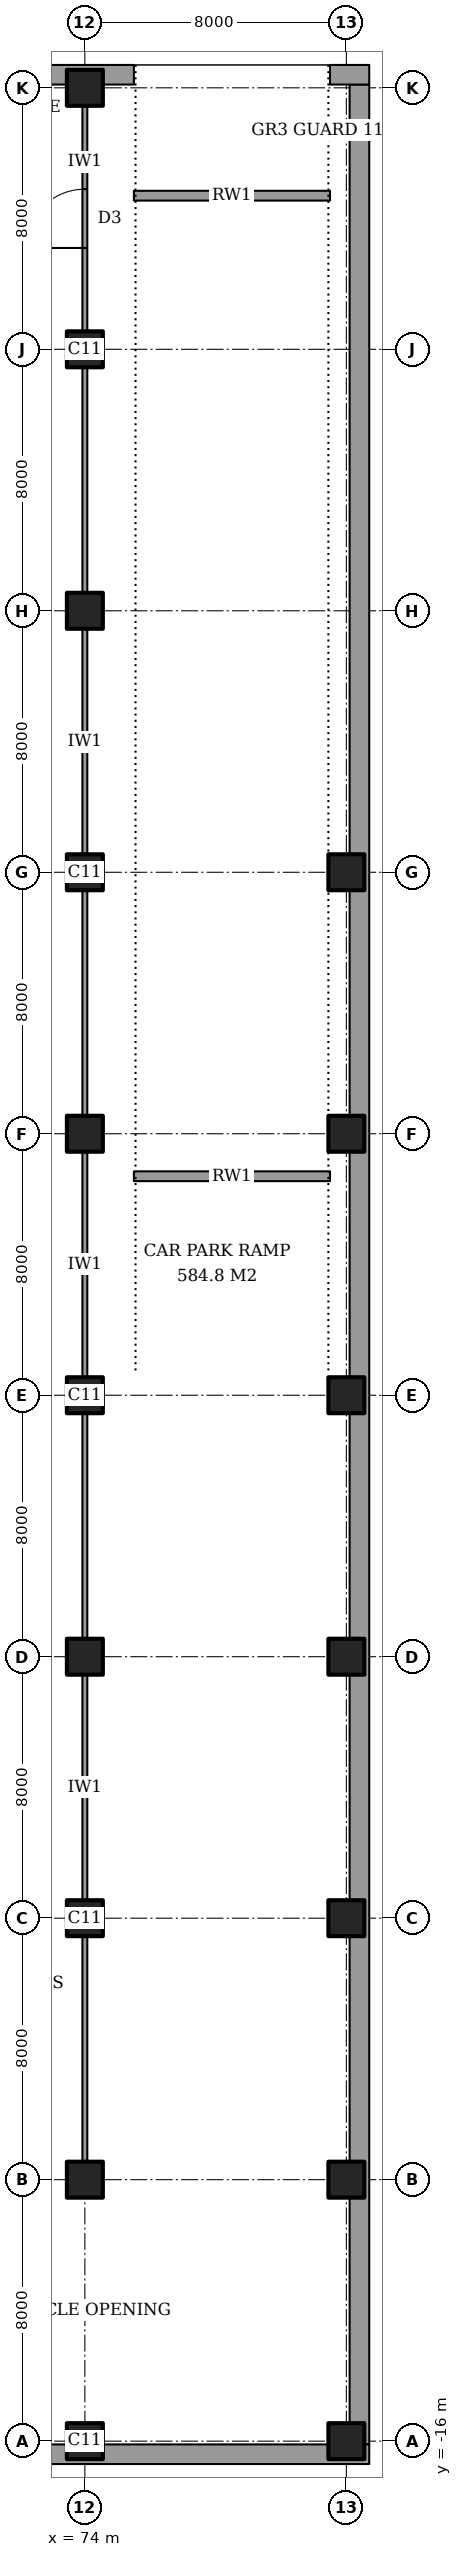
"""IFC4 building model, lengths in metres.
Left out: names, types, materials, properties, quantities, classifications, styles, units other than length and angle.
Written with IfcOpenShell. Run it as: python <this file> out.ifc"""

import sys

from ifc_helpers import new_model, si_unit, direction, frame, frame_2d, origin, origin_2d, place, context, subcontext, project, spatial, rectangle, extrude, element, fill, save


model = new_model("IFC4")
c1 = context("Model", 3, precision=1e-05, world=origin(), true_north=direction((0.0, 1.0)))
c2 = subcontext(c1, "Body", "Model", "MODEL_VIEW")
j1 = project(units=[si_unit("LENGTHUNIT", "METRE"), si_unit("PLANEANGLEUNIT", "RADIAN")], contexts=[c1])
p1 = place(None, origin())
s1 = spatial("IfcSite", under=j1, at=p1, CompositionType="ELEMENT")
p2 = place(p1, origin())
s2 = spatial("IfcBuilding", under=s1, at=p2, CompositionType="ELEMENT")
p3 = place(p2, frame((0.0, 0.0, -5.0)))
s3 = spatial("IfcBuildingStorey", under=s2, at=p3, CompositionType="ELEMENT", Elevation=-5.0)
p4 = place(p3, frame((-16.7, -16.4, -0.4), z_axis=(0.0, 0.0, 1.0), x_axis=(1.0, 0.0, 0.0)))
e1 = element("IfcWall", 1, at=p4, inside=s3, PredefinedType="USERDEFINED", context=c2, shape_type="SweptSolid", body=[
    extrude(rectangle(XDim=99.4, YDim=0.6, at=frame_2d((49.7, 0.0))), origin(), (0.0, 0.0, 1.0), 5.4),
])
p5 = place(p3, frame((82.4, -16.1, -0.4), z_axis=(0.0, 0.0, 1.0), x_axis=(0.0, 1.0, 0.0)))
e2 = element("IfcWall", 2, at=p5, inside=s3, PredefinedType="USERDEFINED", context=c2, shape_type="SweptSolid", body=[
    extrude(rectangle(XDim=72.2, YDim=0.6, at=frame_2d((36.1, 0.0))), origin(), (0.0, 0.0, 1.0), 5.4),
])
p6 = place(p3, frame((-16.7, 56.4, -0.4), z_axis=(0.0, 0.0, 1.0), x_axis=(1.0, 0.0, 0.0)))
e3 = element("IfcWall", 3, at=p6, inside=s3, PredefinedType="USERDEFINED", context=c2, shape_type="SweptSolid", body=[
    extrude(rectangle(XDim=92.2, YDim=0.6, at=frame_2d((46.1, 0.0))), origin(), (0.0, 0.0, 1.0), 5.4),
])
p7 = place(p3, frame((81.5, 56.4, -0.4), z_axis=(0.0, 0.0, 1.0), x_axis=(1.0, 0.0, 0.0)))
e4 = element("IfcWall", 4, at=p7, inside=s3, PredefinedType="USERDEFINED", context=c2, shape_type="SweptSolid", body=[
    extrude(rectangle(XDim=1.2, YDim=0.6, at=frame_2d((0.6, 0.0))), origin(), (0.0, 0.0, 1.0), 5.4),
])
for number, where, z_axis, x_axis in (
    (5, (74.0, -16.0, -0.4), (0.0, 0.0, 1.0), (1.0, 0.0, 0.0)),
    (6, (74.0, -8.0, -0.4), (0.0, 0.0, 1.0), (1.0, 0.0, 0.0)),
    (7, (74.0, 0.0, -0.4), (0.0, 0.0, 1.0), (1.0, 0.0, 0.0)),
    (8, (74.0, 8.0, -0.4), (0.0, 0.0, 1.0), (1.0, 0.0, 0.0)),
    (9, (74.0, 16.0, -0.4), (0.0, 0.0, 1.0), (1.0, 0.0, 0.0)),
    (10, (74.0, 24.0, -0.4), (0.0, 0.0, 1.0), (1.0, 0.0, 0.0)),
    (11, (74.0, 32.0, -0.4), (0.0, 0.0, 1.0), (1.0, 0.0, 0.0)),
    (12, (74.0, 40.0, -0.4), (0.0, 0.0, 1.0), (1.0, 0.0, 0.0)),
    (13, (74.0, 48.0, -0.4), (0.0, 0.0, 1.0), (1.0, 0.0, 0.0)),
    (14, (74.0, 56.0, -0.4), (0.0, 0.0, 1.0), (1.0, 0.0, 0.0)),
    (15, (82.0, -16.0, -0.4), (0.0, 0.0, 1.0), (1.0, 0.0, 0.0)),
    (16, (82.0, -8.0, -0.4), (0.0, 0.0, 1.0), (1.0, 0.0, 0.0)),
    (17, (82.0, 0.0, -0.4), (0.0, 0.0, 1.0), (1.0, 0.0, 0.0)),
    (18, (82.0, 8.0, -0.4), (0.0, 0.0, 1.0), (1.0, 0.0, 0.0)),
    (19, (82.0, 16.0, -0.4), (0.0, 0.0, 1.0), (1.0, 0.0, 0.0)),
    (20, (82.0, 24.0, -0.4), (0.0, 0.0, 1.0), (1.0, 0.0, 0.0)),
    (21, (82.0, 32.0, -0.4), (0.0, 0.0, 1.0), (1.0, 0.0, 0.0)),
):
    element("IfcColumn", number, at=place(p3, frame(where, z_axis=z_axis, x_axis=x_axis)), inside=s3, PredefinedType="COLUMN", context=c2, shape_type="SweptSolid", body=[
        extrude(rectangle(XDim=1.1, YDim=1.1, at=origin_2d()), origin(), (0.0, 0.0, 1.0), 5.4),
    ])
for number, where, z_axis, x_axis in (
    (22, (74.0, -7.45, 0.0), (0.0, 0.0, 1.0), (0.0, 1.0, 0.0)),
    (23, (74.0, 0.55, 0.0), (0.0, 0.0, 1.0), (0.0, 1.0, 0.0)),
    (24, (74.0, 8.55, 0.0), (0.0, 0.0, 1.0), (0.0, 1.0, 0.0)),
    (25, (74.0, 16.55, 0.0), (0.0, 0.0, 1.0), (0.0, 1.0, 0.0)),
    (26, (74.0, 24.55, 0.0), (0.0, 0.0, 1.0), (0.0, 1.0, 0.0)),
    (27, (74.0, 32.55, 0.0), (0.0, 0.0, 1.0), (0.0, 1.0, 0.0)),
    (28, (74.0, 40.55, 0.0), (0.0, 0.0, 1.0), (0.0, 1.0, 0.0)),
):
    element("IfcWall", number, at=place(p3, frame(where, z_axis=z_axis, x_axis=x_axis)), inside=s3, PredefinedType="PARTITIONING", context=c2, shape_type="SweptSolid", body=[
        extrude(rectangle(XDim=6.9, YDim=0.15, at=frame_2d((3.45, 0.0))), origin(), (0.0, 0.0, 1.0), 3.3),
    ])
p8 = place(p3, frame((74.0, 48.55, 0.0), z_axis=(0.0, 0.0, 1.0), x_axis=(0.0, 1.0, 0.0)))
e29 = element("IfcWall", 29, at=p8, inside=s3, PredefinedType="PARTITIONING", context=c2, shape_type="SweptSolid", body=[
    extrude(rectangle(XDim=6.9, YDim=0.15, at=frame_2d((3.45, 0.0))), origin(), (0.0, 0.0, 1.0), 3.3),
])
p9 = place(p8, frame((2.55, 0.0, 0.0)))
e30 = element("IfcOpeningElement", 30, at=p9, cuts=e29, PredefinedType="OPENING", context=c2, shape_type="SweptSolid", body=[
    extrude(rectangle(XDim=1.8, YDim=2.1, at=frame_2d((0.9, 1.05))), frame((0.0, 0.085, 0.0), z_axis=(0.0, -1.0, 0.0), x_axis=(1.0, 0.0, 0.0)), (0.0, 0.0, 1.0), 0.17),
])
p10 = place(p3, frame((75.5, 22.7, 0.0), z_axis=(0.0, 0.0, 1.0), x_axis=(1.0, 0.0, 0.0)))
e31 = element("IfcWall", 31, at=p10, inside=s3, PredefinedType="SOLIDWALL", context=c2, shape_type="SweptSolid", body=[
    extrude(rectangle(XDim=6.0, YDim=0.3, at=frame_2d((3.0, 0.0))), origin(), (0.0, 0.0, 1.0), 0.169),
])
p11 = place(p3, frame((75.5, 52.7, 0.0), z_axis=(0.0, 0.0, 1.0), x_axis=(1.0, 0.0, 0.0)))
e32 = element("IfcWall", 32, at=p11, inside=s3, PredefinedType="SOLIDWALL", context=c2, shape_type="SweptSolid", body=[
    extrude(rectangle(XDim=6.0, YDim=0.3, at=frame_2d((3.0, 0.0))), origin(), (0.0, 0.0, 1.0), 4.454),
])
p12 = place(p9, origin())
e33 = element("IfcDoor", 33, at=p12, inside=s3, OperationType="DOUBLE_DOOR_DOUBLE_SWING", PredefinedType="DOOR", context=c2, shape_type="SweptSolid", body=[
    extrude(rectangle(XDim=1.8, YDim=2.1, at=frame_2d((0.9, 1.05))), frame((0.0, 0.025, 0.0), z_axis=(0.0, -1.0, 0.0), x_axis=(1.0, 0.0, 0.0)), (0.0, 0.0, 1.0), 0.05),
])
fill(e30, e33)
save(model, sys.argv[1])
